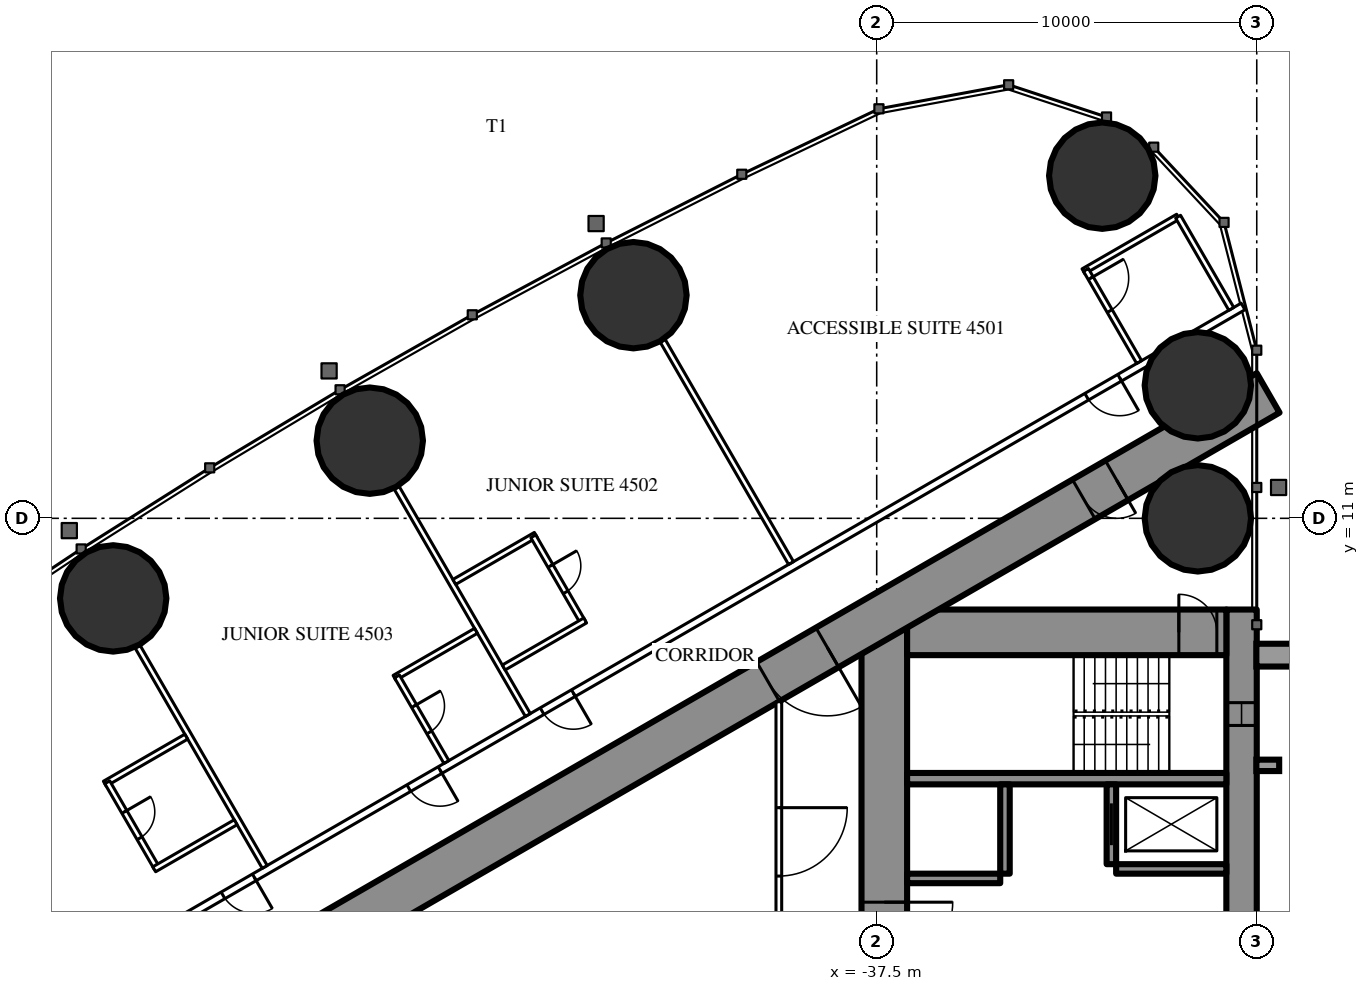
"""IFC4 building model, lengths in metres.
Left out: names, types, materials, properties, quantities, classifications, styles, units other than length and angle.
Written with IfcOpenShell. Run it as: python <this file> out.ifc"""

import sys

from ifc_helpers import new_model, si_unit, direction, frame, frame_2d, origin, origin_2d, place, context, subcontext, project, spatial, rectangle, circle, extrude, element, fill, save


model = new_model("IFC4")
c1 = context("Model", 3, precision=1e-05, world=origin(), true_north=direction((0.0, 1.0)))
c2 = subcontext(c1, "Body", "Model", "MODEL_VIEW")
j1 = project(units=[si_unit("LENGTHUNIT", "METRE"), si_unit("PLANEANGLEUNIT", "RADIAN")], contexts=[c1])
p1 = place(None, origin())
s1 = spatial("IfcSite", under=j1, at=p1, CompositionType="ELEMENT")
p2 = place(p1, origin())
s2 = spatial("IfcBuilding", under=s1, at=p2, CompositionType="ELEMENT")
p3 = place(p2, frame((0.0, 0.0, 170.3)))
s3 = spatial("IfcBuildingStorey", under=s2, at=p3, CompositionType="ELEMENT", Elevation=170.3)
for number, where, z_axis, x_axis in (
    (1, (-31.565, 20.016, 0.0), (0.0, 0.0, 1.0), (1.0, 0.0, 0.0)),
    (2, (-29.05, 11.0, 0.0), (0.0, 0.0, 1.0), (1.0, 0.0, 0.0)),
    (3, (-29.05, 14.5, 0.0), (0.0, 0.0, 1.0), (1.0, 0.0, 0.0)),
    (4, (-43.9, 16.871, 0.0), (0.0, 0.0, 1.0), (1.0, 0.0, 0.0)),
    (5, (-50.839, 13.043, 0.0), (0.0, 0.0, 1.0), (1.0, 0.0, 0.0)),
    (6, (-57.59, 8.893, 0.0), (0.0, 0.0, 1.0), (1.0, 0.0, 0.0)),
):
    element("IfcColumn", number, at=place(p3, frame(where, z_axis=z_axis, x_axis=x_axis)), inside=s3, PredefinedType="COLUMN", context=c2, shape_type="SweptSolid", body=[
        extrude(circle(Radius=1.4, at=origin_2d()), origin(), (0.0, 0.0, 1.0), 3.5),
    ])
p4 = place(p3, frame((-27.9, 8.6, 0.0), z_axis=(0.0, 0.0, 1.0), x_axis=(0.0, -1.0, 0.0)))
e7 = element("IfcWall", 7, at=p4, inside=s3, PredefinedType="SHEAR", context=c2, shape_type="SweptSolid", body=[
    extrude(rectangle(XDim=17.2, YDim=0.8, at=frame_2d((8.6, 0.0))), origin(), (0.0, 0.0, 1.0), 3.5),
])
p5 = place(p4, frame((2.45, 0.0, 0.6)))
e8 = element("IfcOpeningElement", 8, at=p5, cuts=e7, PredefinedType="OPENING", context=c2, shape_type="SweptSolid", body=[
    extrude(rectangle(XDim=0.6, YDim=2.1, at=frame_2d((0.3, 1.05))), frame((0.0, 0.41, 0.0), z_axis=(0.0, -1.0, 0.0), x_axis=(1.0, 0.0, 0.0)), (0.0, 0.0, 1.0), 0.82),
])
p6 = place(p4, frame((14.15, 0.0, 0.6)))
e9 = element("IfcOpeningElement", 9, at=p6, cuts=e7, PredefinedType="OPENING", context=c2, shape_type="SweptSolid", body=[
    extrude(rectangle(XDim=0.6, YDim=2.1, at=frame_2d((0.3, 1.05))), frame((0.0, 0.41, 0.0), z_axis=(0.0, -1.0, 0.0), x_axis=(1.0, 0.0, 0.0)), (0.0, 0.0, 1.0), 0.82),
])
p7 = place(p3, frame((-37.3, 8.6, 0.0), z_axis=(0.0, 0.0, 1.0), x_axis=(0.0, -1.0, 0.0)))
e10 = element("IfcWall", 10, at=p7, inside=s3, PredefinedType="SHEAR", context=c2, shape_type="SweptSolid", body=[
    extrude(rectangle(XDim=17.2, YDim=1.2, at=frame_2d((8.6, 0.0))), origin(), (0.0, 0.0, 1.0), 3.5),
])
p8 = place(p7, frame((7.7, 0.0, 0.0)))
e11 = element("IfcOpeningElement", 11, at=p8, cuts=e10, PredefinedType="OPENING", context=c2, shape_type="SweptSolid", body=[
    extrude(rectangle(XDim=1.8, YDim=2.2, at=frame_2d((0.9, 1.1))), frame((0.0, 0.61, 0.0), z_axis=(0.0, -1.0, 0.0), x_axis=(1.0, 0.0, 0.0)), (0.0, 0.0, 1.0), 1.22),
])
p9 = place(p3, frame((-28.3, 8.0, 0.0), z_axis=(0.0, 0.0, 1.0), x_axis=(-1.0, 0.0, 0.0)))
e12 = element("IfcWall", 12, at=p9, inside=s3, PredefinedType="SHEAR", context=c2, shape_type="SweptSolid", body=[
    extrude(rectangle(XDim=8.4, YDim=1.2, at=frame_2d((4.2, 0.0))), origin(), (0.0, 0.0, 1.0), 3.5),
])
p10 = place(p9, frame((0.25, 0.0, 0.0)))
e13 = element("IfcOpeningElement", 13, at=p10, cuts=e12, PredefinedType="OPENING", context=c2, shape_type="SweptSolid", body=[
    extrude(rectangle(XDim=1.0, YDim=2.2, at=frame_2d((0.5, 1.1))), frame((0.0, 0.61, 0.0), z_axis=(0.0, -1.0, 0.0), x_axis=(1.0, 0.0, 0.0)), (0.0, 0.0, 1.0), 1.22),
])
p11 = place(p3, frame((-28.3, 4.15, 0.0), z_axis=(0.0, 0.0, 1.0), x_axis=(-1.0, 0.0, 0.0)))
e14 = element("IfcWall", 14, at=p11, inside=s3, PredefinedType="SHEAR", context=c2, shape_type="SweptSolid", body=[
    extrude(rectangle(XDim=8.4, YDim=0.3, at=frame_2d((4.2, 0.0))), origin(), (0.0, 0.0, 1.0), 3.5),
])
p12 = place(p3, frame((-31.325, 4.0, 0.0), z_axis=(0.0, 0.0, 1.0), x_axis=(0.0, -1.0, 0.0)))
e15 = element("IfcWall", 15, at=p12, inside=s3, PredefinedType="SHEAR", context=c2, shape_type="SweptSolid", body=[
    extrude(rectangle(XDim=2.1, YDim=0.25, at=frame_2d((1.05, 0.0))), origin(), (0.0, 0.0, 1.0), 3.5),
])
p13 = place(p12, frame((0.5, 0.0, 0.0)))
e16 = element("IfcOpeningElement", 16, at=p13, cuts=e15, PredefinedType="OPENING", context=c2, shape_type="SweptSolid", body=[
    extrude(rectangle(XDim=1.1, YDim=2.2, at=frame_2d((0.55, 1.1))), frame((0.0, 0.135, 0.0), z_axis=(0.0, -1.0, 0.0), x_axis=(1.0, 0.0, 0.0)), (0.0, 0.0, 1.0), 0.27),
])
p14 = place(p3, frame((-34.125, 4.0, 0.0), z_axis=(0.0, 0.0, 1.0), x_axis=(0.0, -1.0, 0.0)))
e17 = element("IfcWall", 17, at=p14, inside=s3, PredefinedType="SHEAR", context=c2, shape_type="SweptSolid", body=[
    extrude(rectangle(XDim=2.35, YDim=0.25, at=frame_2d((1.175, 0.0))), origin(), (0.0, 0.0, 1.0), 3.5),
])
p15 = place(p3, frame((-28.3, 1.775, 0.0), z_axis=(0.0, 0.0, 1.0), x_axis=(-1.0, 0.0, 0.0)))
e18 = element("IfcWall", 18, at=p15, inside=s3, PredefinedType="SHEAR", context=c2, shape_type="SweptSolid", body=[
    extrude(rectangle(XDim=2.9, YDim=0.25, at=frame_2d((1.45, 0.0))), origin(), (0.0, 0.0, 1.0), 3.5),
])
p16 = place(p3, frame((-34.25, 1.525, 0.0), z_axis=(0.0, 0.0, 1.0), x_axis=(-1.0, 0.0, 0.0)))
e19 = element("IfcWall", 19, at=p16, inside=s3, PredefinedType="SHEAR", context=c2, shape_type="SweptSolid", body=[
    extrude(rectangle(XDim=2.45, YDim=0.25, at=frame_2d((1.225, 0.0))), origin(), (0.0, 0.0, 1.0), 3.5),
])
p17 = place(p3, frame((-27.2, 14.3, 0.0), z_axis=(0.0, 0.0, 1.0), x_axis=(-0.866026593062, -0.499997940104, 0.0)))
e20 = element("IfcWall", 20, at=p17, inside=s3, PredefinedType="SHEAR", context=c2, shape_type="SweptSolid", body=[
    extrude(rectangle(XDim=28.946, YDim=1.2, at=frame_2d((14.473, 0.0))), origin(), (0.0, 0.0, 1.0), 3.5),
])
p18 = place(p17, frame((4.6, 0.0, 0.0)))
e21 = element("IfcOpeningElement", 21, at=p18, cuts=e20, PredefinedType="OPENING", context=c2, shape_type="SweptSolid", body=[
    extrude(rectangle(XDim=1.0, YDim=2.2, at=frame_2d((0.5, 1.1))), frame((0.0, 0.61, 0.0), z_axis=(0.0, -1.0, 0.0), x_axis=(1.0, 0.0, 0.0)), (0.0, 0.0, 1.0), 1.22),
])
p19 = place(p17, frame((13.395, 0.0, 0.0)))
e22 = element("IfcOpeningElement", 22, at=p19, cuts=e20, PredefinedType="OPENING", context=c2, shape_type="SweptSolid", body=[
    extrude(rectangle(XDim=1.8, YDim=2.2, at=frame_2d((0.9, 1.1))), frame((0.0, 0.61, 0.0), z_axis=(0.0, -1.0, 0.0), x_axis=(1.0, 0.0, 0.0)), (0.0, 0.0, 1.0), 1.22),
])
p20 = place(p3, frame((-27.86, 16.575, 0.0), z_axis=(0.0, 0.0, 1.0), x_axis=(-0.866025533911, -0.499999774615, 0.0)))
e23 = element("IfcWall", 23, at=p20, inside=s3, PredefinedType="PARTITIONING", context=c2, shape_type="SweptSolid", body=[
    extrude(rectangle(XDim=33.149, YDim=0.2, at=frame_2d((16.575, 0.0))), origin(), (0.0, 0.0, 1.0), 3.25),
])
p21 = place(p20, frame((3.75, 0.0, 0.0)))
e24 = element("IfcOpeningElement", 24, at=p21, cuts=e23, PredefinedType="OPENING", context=c2, shape_type="SweptSolid", body=[
    extrude(rectangle(XDim=1.0, YDim=2.2, at=frame_2d((0.5, 1.1))), frame((0.0, 0.11, 0.0), z_axis=(0.0, -1.0, 0.0), x_axis=(1.0, 0.0, 0.0)), (0.0, 0.0, 1.0), 0.22),
])
p22 = place(p20, frame((20.347, 0.0, 0.0)))
e25 = element("IfcOpeningElement", 25, at=p22, cuts=e23, PredefinedType="OPENING", context=c2, shape_type="SweptSolid", body=[
    extrude(rectangle(XDim=0.95, YDim=2.2, at=frame_2d((0.475, 1.1))), frame((0.0, 0.11, 0.0), z_axis=(0.0, -1.0, 0.0), x_axis=(1.0, 0.0, 0.0)), (0.0, 0.0, 1.0), 0.22),
])
p23 = place(p20, frame((24.397, 0.0, 0.0)))
e26 = element("IfcOpeningElement", 26, at=p23, cuts=e23, PredefinedType="OPENING", context=c2, shape_type="SweptSolid", body=[
    extrude(rectangle(XDim=0.95, YDim=2.2, at=frame_2d((0.475, 1.1))), frame((0.0, 0.11, 0.0), z_axis=(0.0, -1.0, 0.0), x_axis=(1.0, 0.0, 0.0)), (0.0, 0.0, 1.0), 0.22),
])
p24 = place(p20, frame((30.042, 0.0, 0.0)))
e27 = element("IfcOpeningElement", 27, at=p24, cuts=e23, PredefinedType="OPENING", context=c2, shape_type="SweptSolid", body=[
    extrude(rectangle(XDim=0.95, YDim=2.2, at=frame_2d((0.475, 1.1))), frame((0.0, 0.11, 0.0), z_axis=(0.0, -1.0, 0.0), x_axis=(1.0, 0.0, 0.0)), (0.0, 0.0, 1.0), 0.22),
])
p25 = place(p3, frame((-39.754, 9.823, 0.0), z_axis=(0.0, 0.0, 1.0), x_axis=(-0.499997670926, 0.866026748472, 0.0)))
e28 = element("IfcWall", 28, at=p25, inside=s3, PredefinedType="PARTITIONING", context=c2, shape_type="SweptSolid", body=[
    extrude(rectangle(XDim=6.757, YDim=0.15, at=frame_2d((3.379, 0.0))), origin(), (0.0, 0.0, 1.0), 2.3),
])
p26 = place(p3, frame((-46.679, 5.825, 0.0), z_axis=(0.0, 0.0, 1.0), x_axis=(-0.500006839597, 0.866021454905, 0.0)))
e29 = element("IfcWall", 29, at=p26, inside=s3, PredefinedType="PARTITIONING", context=c2, shape_type="SweptSolid", body=[
    extrude(rectangle(XDim=6.911, YDim=0.15, at=frame_2d((3.456, 0.0))), origin(), (0.0, 0.0, 1.0), 2.3),
])
p27 = place(p3, frame((-53.602, 1.828, 0.0), z_axis=(0.0, 0.0, 1.0), x_axis=(-0.49999191814, 0.866030069798, 0.0)))
e30 = element("IfcWall", 30, at=p27, inside=s3, PredefinedType="PARTITIONING", context=c2, shape_type="SweptSolid", body=[
    extrude(rectangle(XDim=6.692, YDim=0.15, at=frame_2d((3.346, 0.0))), origin(), (0.0, 0.0, 1.0), 2.3),
])
p28 = place(p3, frame((-29.57, 18.936, 0.0), z_axis=(0.0, 0.0, 1.0), x_axis=(-0.866018712932, -0.500011588718, 0.0)))
e31 = element("IfcWall", 31, at=p28, inside=s3, PredefinedType="PARTITIONING", context=c2, shape_type="SweptSolid", body=[
    extrude(rectangle(XDim=2.875, YDim=0.15, at=frame_2d((1.438, 0.0))), origin(), (0.0, 0.0, 1.0), 3.25),
])
p29 = place(p3, frame((-30.595, 15.111, 0.0), z_axis=(0.0, 0.0, 1.0), x_axis=(-0.49998411664, 0.866034573852, 0.0)))
e32 = element("IfcWall", 32, at=p29, inside=s3, PredefinedType="PARTITIONING", context=c2, shape_type="SweptSolid", body=[
    extrude(rectangle(XDim=2.8, YDim=0.15, at=frame_2d((1.4, 0.0))), origin(), (0.0, 0.0, 1.0), 3.25),
])
p30 = place(p29, frame((1.55, 0.0, 0.0)))
e33 = element("IfcOpeningElement", 33, at=p30, cuts=e32, PredefinedType="OPENING", context=c2, shape_type="SweptSolid", body=[
    extrude(rectangle(XDim=1.0, YDim=2.2, at=frame_2d((0.5, 1.1))), frame((0.0, 0.085, 0.0), z_axis=(0.0, -1.0, 0.0), x_axis=(1.0, 0.0, 0.0)), (0.0, 0.0, 1.0), 0.17),
])
p31 = place(p3, frame((-28.17, 16.511, 0.0), z_axis=(0.0, 0.0, 1.0), x_axis=(-0.49994636267, 0.866056369097, 0.0)))
e34 = element("IfcWall", 34, at=p31, inside=s3, PredefinedType="PARTITIONING", context=c2, shape_type="SweptSolid", body=[
    extrude(rectangle(XDim=2.8, YDim=0.15, at=frame_2d((1.4, 0.0))), origin(), (0.0, 0.0, 1.0), 3.25),
])
p32 = place(p3, frame((-46.47, 10.564, 0.0), z_axis=(0.0, 0.0, 1.0), x_axis=(-0.866006523861, -0.500032699561, 0.0)))
e35 = element("IfcWall", 35, at=p32, inside=s3, PredefinedType="PARTITIONING", context=c2, shape_type="SweptSolid", body=[
    extrude(rectangle(XDim=2.475, YDim=0.15, at=frame_2d((1.237, 0.0))), origin(), (0.0, 0.0, 1.0), 3.25),
])
p33 = place(p3, frame((-45.235, 8.275, 0.0), z_axis=(0.0, 0.0, 1.0), x_axis=(-0.500006934395, 0.866021400173, 0.0)))
e36 = element("IfcWall", 36, at=p33, inside=s3, PredefinedType="PARTITIONING", context=c2, shape_type="SweptSolid", body=[
    extrude(rectangle(XDim=2.6, YDim=0.15, at=frame_2d((1.3, 0.0))), origin(), (0.0, 0.0, 1.0), 3.25),
])
p34 = place(p33, frame((0.9, 0.0, 0.0)))
e37 = element("IfcOpeningElement", 37, at=p34, cuts=e36, PredefinedType="OPENING", context=c2, shape_type="SweptSolid", body=[
    extrude(rectangle(XDim=0.8, YDim=2.2, at=frame_2d((0.4, 1.1))), frame((0.0, 0.085, 0.0), z_axis=(0.0, -1.0, 0.0), x_axis=(1.0, 0.0, 0.0)), (0.0, 0.0, 1.0), 0.17),
])
for number, where, z_axis, x_axis in (
    (38, (-45.17, 8.312, 0.0), (0.0, 0.0, 1.0), (-0.866, -0.5, 0.0)),
    (39, (-48.044, 8.039, 0.0), (0.0, 0.0, 1.0), (-0.866, -0.5, 0.0)),
):
    element("IfcWall", number, at=place(p3, frame(where, z_axis=z_axis, x_axis=x_axis)), inside=s3, PredefinedType="PARTITIONING", context=c2, shape_type="SweptSolid", body=[
        extrude(rectangle(XDim=2.475, YDim=0.15, at=frame_2d((1.238, 0.0))), origin(), (0.0, 0.0, 1.0), 3.25),
    ])
p35 = place(p3, frame((-48.822, 4.588, 0.0), z_axis=(0.0, 0.0, 1.0), x_axis=(-0.500006934395, 0.866021400173, 0.0)))
e40 = element("IfcWall", 40, at=p35, inside=s3, PredefinedType="PARTITIONING", context=c2, shape_type="SweptSolid", body=[
    extrude(rectangle(XDim=2.6, YDim=0.15, at=frame_2d((1.3, 0.0))), origin(), (0.0, 0.0, 1.0), 3.25),
])
p36 = place(p35, frame((0.9, 0.0, 0.0)))
e41 = element("IfcOpeningElement", 41, at=p36, cuts=e40, PredefinedType="OPENING", context=c2, shape_type="SweptSolid", body=[
    extrude(rectangle(XDim=0.8, YDim=2.2, at=frame_2d((0.4, 1.1))), frame((0.0, 0.085, 0.0), z_axis=(0.0, -1.0, 0.0), x_axis=(1.0, 0.0, 0.0)), (0.0, 0.0, 1.0), 0.17),
])
p37 = place(p3, frame((-55.667, 5.255, 0.0), z_axis=(0.0, 0.0, 1.0), x_axis=(-0.866006523861, -0.500032699561, 0.0)))
e42 = element("IfcWall", 42, at=p37, inside=s3, PredefinedType="PARTITIONING", context=c2, shape_type="SweptSolid", body=[
    extrude(rectangle(XDim=2.475, YDim=0.15, at=frame_2d((1.237, 0.0))), origin(), (0.0, 0.0, 1.0), 3.25),
])
p38 = place(p3, frame((-56.446, 1.803, 0.0), z_axis=(0.0, 0.0, 1.0), x_axis=(-0.499936506574, 0.866062058628, 0.0)))
e43 = element("IfcWall", 43, at=p38, inside=s3, PredefinedType="PARTITIONING", context=c2, shape_type="SweptSolid", body=[
    extrude(rectangle(XDim=2.6, YDim=0.15, at=frame_2d((1.3, 0.0))), origin(), (0.0, 0.0, 1.0), 3.25),
])
p39 = place(p38, frame((0.9, 0.0, 0.0)))
e44 = element("IfcOpeningElement", 44, at=p39, cuts=e43, PredefinedType="OPENING", context=c2, shape_type="SweptSolid", body=[
    extrude(rectangle(XDim=0.8, YDim=2.2, at=frame_2d((0.4, 1.1))), frame((0.0, 0.085, 0.0), z_axis=(0.0, -1.0, 0.0), x_axis=(1.0, 0.0, 0.0)), (0.0, 0.0, 1.0), 0.17),
])
p40 = place(p3, frame((-54.367, 3.003, 0.0), z_axis=(0.0, 0.0, 1.0), x_axis=(-0.866031185235, -0.4999899861, 0.0)))
e45 = element("IfcWall", 45, at=p40, inside=s3, PredefinedType="PARTITIONING", context=c2, shape_type="SweptSolid", body=[
    extrude(rectangle(XDim=2.475, YDim=0.15, at=frame_2d((1.238, 0.0))), origin(), (0.0, 0.0, 1.0), 3.25),
])
p41 = place(p3, frame((-40.075, 6.174, 0.0), z_axis=(0.0, 0.0, 1.0), x_axis=(0.0, -1.0, 0.0)))
e46 = element("IfcWall", 46, at=p41, inside=s3, PredefinedType="PARTITIONING", context=c2, shape_type="SweptSolid", body=[
    extrude(rectangle(XDim=7.374, YDim=0.15, at=frame_2d((3.687, 0.0))), origin(), (0.0, 0.0, 1.0), 3.25),
])
p42 = place(p41, frame((2.787, 0.0, 0.0)))
e47 = element("IfcOpeningElement", 47, at=p42, cuts=e46, PredefinedType="OPENING", context=c2, shape_type="SweptSolid", body=[
    extrude(rectangle(XDim=1.8, YDim=2.2, at=frame_2d((0.9, 1.1))), frame((0.0, 0.085, 0.0), z_axis=(0.0, -1.0, 0.0), x_axis=(1.0, 0.0, 0.0)), (0.0, 0.0, 1.0), 0.17),
])
p43 = place(p30, origin())
e48 = element("IfcDoor", 48, at=p43, inside=s3, OperationType="SINGLE_SWING_RIGHT", PredefinedType="DOOR", context=c2, shape_type="SweptSolid", body=[
    extrude(rectangle(XDim=1.0, YDim=2.2, at=frame_2d((0.5, 1.1))), frame((0.0, 0.025, 0.0), z_axis=(0.0, -1.0, 0.0), x_axis=(1.0, 0.0, 0.0)), (0.0, 0.0, 1.0), 0.05),
])
fill(e33, e48)
p44 = place(p21, origin())
e49 = element("IfcDoor", 49, at=p44, inside=s3, OperationType="SINGLE_SWING_LEFT", PredefinedType="DOOR", context=c2, shape_type="SweptSolid", body=[
    extrude(rectangle(XDim=1.0, YDim=2.2, at=frame_2d((0.5, 1.1))), frame((0.0, 0.025, 0.0), z_axis=(0.0, -1.0, 0.0), x_axis=(1.0, 0.0, 0.0)), (0.0, 0.0, 1.0), 0.05),
])
fill(e24, e49)
p45 = place(p34, origin())
e50 = element("IfcDoor", 50, at=p45, inside=s3, OperationType="SINGLE_SWING_RIGHT", PredefinedType="DOOR", context=c2, shape_type="SweptSolid", body=[
    extrude(rectangle(XDim=0.8, YDim=2.2, at=frame_2d((0.4, 1.1))), frame((0.0, 0.025, 0.0), z_axis=(0.0, -1.0, 0.0), x_axis=(1.0, 0.0, 0.0)), (0.0, 0.0, 1.0), 0.05),
])
fill(e37, e50)
p46 = place(p22, origin())
e51 = element("IfcDoor", 51, at=p46, inside=s3, OperationType="SINGLE_SWING_LEFT", PredefinedType="DOOR", context=c2, shape_type="SweptSolid", body=[
    extrude(rectangle(XDim=0.95, YDim=2.2, at=frame_2d((0.475, 1.1))), frame((0.0, 0.025, 0.0), z_axis=(0.0, -1.0, 0.0), x_axis=(1.0, 0.0, 0.0)), (0.0, 0.0, 1.0), 0.05),
])
fill(e25, e51)
p47 = place(p36, origin())
e52 = element("IfcDoor", 52, at=p47, inside=s3, OperationType="SINGLE_SWING_RIGHT", PredefinedType="DOOR", context=c2, shape_type="SweptSolid", body=[
    extrude(rectangle(XDim=0.8, YDim=2.2, at=frame_2d((0.4, 1.1))), frame((0.0, 0.025, 0.0), z_axis=(0.0, -1.0, 0.0), x_axis=(1.0, 0.0, 0.0)), (0.0, 0.0, 1.0), 0.05),
])
fill(e41, e52)
p48 = place(p23, origin())
e53 = element("IfcDoor", 53, at=p48, inside=s3, OperationType="SINGLE_SWING_LEFT", PredefinedType="DOOR", context=c2, shape_type="SweptSolid", body=[
    extrude(rectangle(XDim=0.95, YDim=2.2, at=frame_2d((0.475, 1.1))), frame((0.0, 0.025, 0.0), z_axis=(0.0, -1.0, 0.0), x_axis=(1.0, 0.0, 0.0)), (0.0, 0.0, 1.0), 0.05),
])
fill(e26, e53)
p49 = place(p39, origin())
e54 = element("IfcDoor", 54, at=p49, inside=s3, OperationType="SINGLE_SWING_RIGHT", PredefinedType="DOOR", context=c2, shape_type="SweptSolid", body=[
    extrude(rectangle(XDim=0.8, YDim=2.2, at=frame_2d((0.4, 1.1))), frame((0.0, 0.025, 0.0), z_axis=(0.0, -1.0, 0.0), x_axis=(1.0, 0.0, 0.0)), (0.0, 0.0, 1.0), 0.05),
])
fill(e44, e54)
p50 = place(p24, origin())
e55 = element("IfcDoor", 55, at=p50, inside=s3, OperationType="SINGLE_SWING_LEFT", PredefinedType="DOOR", context=c2, shape_type="SweptSolid", body=[
    extrude(rectangle(XDim=0.95, YDim=2.2, at=frame_2d((0.475, 1.1))), frame((0.0, 0.025, 0.0), z_axis=(0.0, -1.0, 0.0), x_axis=(1.0, 0.0, 0.0)), (0.0, 0.0, 1.0), 0.05),
])
fill(e27, e55)
p51 = place(p42, origin())
e56 = element("IfcDoor", 56, at=p51, inside=s3, OperationType="DOUBLE_DOOR_SINGLE_SWING", PredefinedType="DOOR", context=c2, shape_type="SweptSolid", body=[
    extrude(rectangle(XDim=1.8, YDim=2.2, at=frame_2d((0.9, 1.1))), frame((0.0, 0.025, 0.0), z_axis=(0.0, -1.0, 0.0), x_axis=(1.0, 0.0, 0.0)), (0.0, 0.0, 1.0), 0.05),
])
fill(e47, e56)
p52 = place(p18, origin())
e57 = element("IfcDoor", 57, at=p52, inside=s3, OperationType="SINGLE_SWING_LEFT", PredefinedType="DOOR", context=c2, shape_type="SweptSolid", body=[
    extrude(rectangle(XDim=1.0, YDim=2.2, at=frame_2d((0.5, 1.1))), frame((0.0, 0.025, 0.0), z_axis=(0.0, -1.0, 0.0), x_axis=(1.0, 0.0, 0.0)), (0.0, 0.0, 1.0), 0.05),
])
fill(e21, e57)
p53 = place(p19, origin())
e58 = element("IfcDoor", 58, at=p53, inside=s3, OperationType="DOUBLE_DOOR_SINGLE_SWING", PredefinedType="DOOR", context=c2, shape_type="SweptSolid", body=[
    extrude(rectangle(XDim=1.8, YDim=2.2, at=frame_2d((0.9, 1.1))), frame((0.0, 0.025, 0.0), z_axis=(0.0, -1.0, 0.0), x_axis=(1.0, 0.0, 0.0)), (0.0, 0.0, 1.0), 0.05),
])
fill(e22, e58)
p54 = place(p8, origin())
e59 = element("IfcDoor", 59, at=p54, inside=s3, OperationType="DOUBLE_DOOR_SINGLE_SWING", PredefinedType="DOOR", context=c2, shape_type="SweptSolid", body=[
    extrude(rectangle(XDim=1.8, YDim=2.2, at=frame_2d((0.9, 1.1))), frame((0.0, 0.025, 0.0), z_axis=(0.0, -1.0, 0.0), x_axis=(1.0, 0.0, 0.0)), (0.0, 0.0, 1.0), 0.05),
])
fill(e11, e59)
p55 = place(p10, origin())
e60 = element("IfcDoor", 60, at=p55, inside=s3, OperationType="SINGLE_SWING_RIGHT", PredefinedType="DOOR", context=c2, shape_type="SweptSolid", body=[
    extrude(rectangle(XDim=1.0, YDim=2.2, at=frame_2d((0.5, 1.1))), frame((0.0, 0.025, 0.0), z_axis=(0.0, -1.0, 0.0), x_axis=(1.0, 0.0, 0.0)), (0.0, 0.0, 1.0), 0.05),
])
fill(e13, e60)
p56 = place(p13, origin())
e61 = element("IfcDoor", 61, at=p56, inside=s3, OperationType="SLIDING_TO_LEFT", PredefinedType="USERDEFINED", context=c2, shape_type="SweptSolid", body=[
    extrude(rectangle(XDim=1.1, YDim=2.2, at=frame_2d((0.55, 1.1))), frame((0.0, 0.025, 0.0), z_axis=(0.0, -1.0, 0.0), x_axis=(1.0, 0.0, 0.0)), (0.0, 0.0, 1.0), 0.05),
])
fill(e16, e61)
p57 = place(p5, origin())
e62 = element("IfcWindow", 62, at=p57, inside=s3, PartitioningType="SINGLE_PANEL", PredefinedType="WINDOW", context=c2, shape_type="SweptSolid", body=[
    extrude(rectangle(XDim=0.6, YDim=2.1, at=frame_2d((0.3, 1.05))), frame((0.0, 0.03, 0.0), z_axis=(0.0, -1.0, 0.0), x_axis=(1.0, 0.0, 0.0)), (0.0, 0.0, 1.0), 0.06),
])
fill(e8, e62)
save(model, sys.argv[1])
